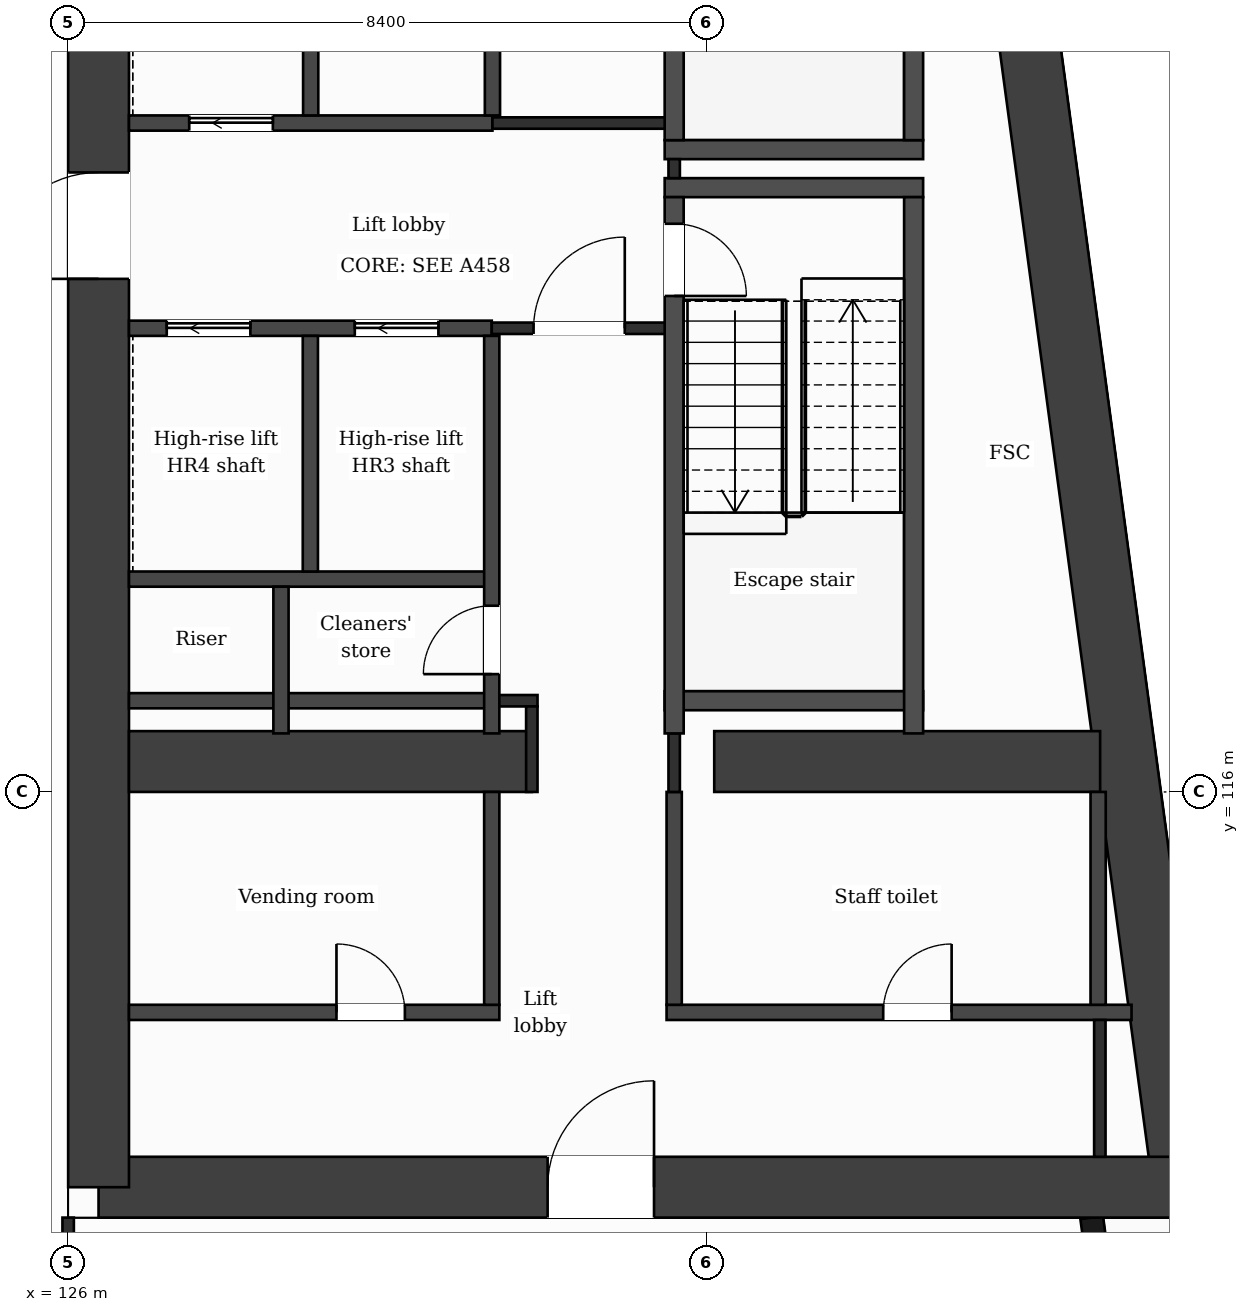
"""IFC4 building model, lengths in metres.
Left out: names, types, materials, properties, quantities, classifications, styles, units other than length and angle.
Written with IfcOpenShell. Run it as: python <this file> out.ifc"""

import sys

from ifc_helpers import new_model, si_unit, direction, frame, frame_2d, origin, place, context, subcontext, project, spatial, rectangle, extrude, element, fill, save


model = new_model("IFC4")
c1 = context("Model", 3, precision=1e-05, world=origin(), true_north=direction((0.0, 1.0)))
c2 = subcontext(c1, "Body", "Model", "MODEL_VIEW")
j1 = project(units=[si_unit("LENGTHUNIT", "METRE"), si_unit("PLANEANGLEUNIT", "RADIAN")], contexts=[c1])
p1 = place(None, origin())
s1 = spatial("IfcSite", under=j1, at=p1, CompositionType="ELEMENT")
p2 = place(p1, origin())
s2 = spatial("IfcBuilding", under=s1, at=p2, CompositionType="ELEMENT")
p3 = place(p2, frame((0.0, 0.0, 235.5)))
s3 = spatial("IfcBuildingStorey", under=s2, at=p3, CompositionType="ELEMENT", Elevation=235.5)
p4 = place(p3, frame((137.82, 132.0, 0.0), z_axis=(0.0, 0.0, 1.0), x_axis=(0.133408347329, -0.991061154956, 0.0)))
e1 = element("IfcWall", 1, at=p4, inside=s3, PredefinedType="SHEAR", context=c2, shape_type="SweptSolid", body=[
    extrude(rectangle(XDim=21.391, YDim=0.8, at=frame_2d((10.696, 0.0))), origin(), (0.0, 0.0, 1.0), 3.7),
])
p5 = place(p3, frame((140.673, 110.8, 0.0), z_axis=(0.0, 0.0, 1.0), x_axis=(-1.0, 0.0, 0.0)))
e2 = element("IfcWall", 2, at=p5, inside=s3, PredefinedType="SHEAR", context=c2, shape_type="SweptSolid", body=[
    extrude(rectangle(XDim=14.273, YDim=0.8, at=frame_2d((7.137, 0.0))), origin(), (0.0, 0.0, 1.0), 3.7),
])
p6 = place(p5, frame((6.965, 0.0, 0.0)))
e3 = element("IfcOpeningElement", 3, at=p6, cuts=e2, PredefinedType="OPENING", context=c2, shape_type="SweptSolid", body=[
    extrude(rectangle(XDim=1.4, YDim=2.1, at=frame_2d((0.7, 1.05))), frame((0.0, 0.41, 0.0), z_axis=(0.0, -1.0, 0.0), x_axis=(1.0, 0.0, 0.0)), (0.0, 0.0, 1.0), 0.82),
])
p7 = place(p3, frame((126.4, 110.8, 0.0), z_axis=(0.0, 0.0, 1.0), x_axis=(0.0, 1.0, 0.0)))
e4 = element("IfcWall", 4, at=p7, inside=s3, PredefinedType="SHEAR", context=c2, shape_type="SweptSolid", body=[
    extrude(rectangle(XDim=21.2, YDim=0.8, at=frame_2d((10.6, 0.0))), origin(), (0.0, 0.0, 1.0), 3.7),
])
p8 = place(p7, frame((11.95, 0.0, 0.0)))
e5 = element("IfcOpeningElement", 5, at=p8, cuts=e4, PredefinedType="OPENING", context=c2, shape_type="SweptSolid", body=[
    extrude(rectangle(XDim=1.4, YDim=2.1, at=frame_2d((0.7, 1.05))), frame((0.0, 0.41, 0.0), z_axis=(0.0, -1.0, 0.0), x_axis=(1.0, 0.0, 0.0)), (0.0, 0.0, 1.0), 0.82),
])
p9 = place(p3, frame((126.8, 116.4, 0.0), z_axis=(0.0, 0.0, 1.0), x_axis=(1.0, 0.0, 0.0)))
e6 = element("IfcWall", 6, at=p9, inside=s3, PredefinedType="SHEAR", context=c2, shape_type="SweptSolid", body=[
    extrude(rectangle(XDim=5.3, YDim=0.8, at=frame_2d((2.65, 0.0))), origin(), (0.0, 0.0, 1.0), 3.7),
])
p10 = place(p3, frame((134.5, 116.4, 0.0), z_axis=(0.0, 0.0, 1.0), x_axis=(1.0, 0.0, 0.0)))
e7 = element("IfcWall", 7, at=p10, inside=s3, PredefinedType="SHEAR", context=c2, shape_type="SweptSolid", body=[
    extrude(rectangle(XDim=5.077, YDim=0.8, at=frame_2d((2.539, 0.0))), origin(), (0.0, 0.0, 1.0), 3.7),
])
p11 = place(p3, frame((140.348, 103.85, 0.0), z_axis=(0.0, 0.0, 1.0), x_axis=(-0.133431549479, 0.991058031401, 0.0)))
e8 = element("IfcWall", 8, at=p11, inside=s3, PredefinedType="SOLIDWALL", context=c2, shape_type="SweptSolid", body=[
    extrude(rectangle(XDim=6.609, YDim=0.3, at=frame_2d((3.304, 0.0))), origin(), (0.0, 0.0, 1.0), 3.38),
])
p12 = place(p11, frame((0.737, 0.0, 0.9)))
e9 = element("IfcOpeningElement", 9, at=p12, cuts=e8, PredefinedType="OPENING", context=c2, shape_type="SweptSolid", body=[
    extrude(rectangle(XDim=1.2, YDim=2.1, at=frame_2d((0.6, 1.05))), frame((0.0, 0.16, 0.0), z_axis=(0.0, -1.0, 0.0), x_axis=(1.0, 0.0, 0.0)), (0.0, 0.0, 1.0), 0.32),
])
p13 = place(p11, frame((3.991, 0.0, 0.0)))
e10 = element("IfcOpeningElement", 10, at=p13, cuts=e8, PredefinedType="OPENING", context=c2, shape_type="SweptSolid", body=[
    extrude(rectangle(XDim=1.2, YDim=2.4, at=frame_2d((0.6, 1.2))), frame((0.0, 0.16, 0.0), z_axis=(0.0, -1.0, 0.0), x_axis=(1.0, 0.0, 0.0)), (0.0, 0.0, 1.0), 0.32),
])
p14 = place(p3, frame((126.8, 113.1, 0.0), z_axis=(0.0, 0.0, 1.0), x_axis=(1.0, 0.0, 0.0)))
e11 = element("IfcWall", 11, at=p14, inside=s3, PredefinedType="PARTITIONING", context=c2, shape_type="SweptSolid", body=[
    extrude(rectangle(XDim=4.873, YDim=0.2, at=frame_2d((2.437, 0.0))), origin(), (0.0, 0.0, 1.0), 3.38),
])
p15 = place(p14, frame((2.73, 0.0, 0.0)))
e12 = element("IfcOpeningElement", 12, at=p15, cuts=e11, PredefinedType="OPENING", context=c2, shape_type="SweptSolid", body=[
    extrude(rectangle(XDim=0.9, YDim=2.1, at=frame_2d((0.45, 1.05))), frame((0.0, 0.11, 0.0), z_axis=(0.0, -1.0, 0.0), x_axis=(1.0, 0.0, 0.0)), (0.0, 0.0, 1.0), 0.22),
])
p16 = place(p3, frame((133.873, 113.1, 0.0), z_axis=(0.0, 0.0, 1.0), x_axis=(1.0, 0.0, 0.0)))
e13 = element("IfcWall", 13, at=p16, inside=s3, PredefinedType="PARTITIONING", context=c2, shape_type="SweptSolid", body=[
    extrude(rectangle(XDim=6.117, YDim=0.2, at=frame_2d((3.059, 0.0))), origin(), (0.0, 0.0, 1.0), 3.38),
])
p17 = place(p16, frame((2.85, 0.0, 0.0)))
e14 = element("IfcOpeningElement", 14, at=p17, cuts=e13, PredefinedType="OPENING", context=c2, shape_type="SweptSolid", body=[
    extrude(rectangle(XDim=0.9, YDim=2.1, at=frame_2d((0.45, 1.05))), frame((0.0, 0.11, 0.0), z_axis=(0.0, -1.0, 0.0), x_axis=(1.0, 0.0, 0.0)), (0.0, 0.0, 1.0), 0.22),
])
p18 = place(p3, frame((126.8, 117.2, 0.0), z_axis=(0.0, 0.0, 1.0), x_axis=(1.0, 0.0, 0.0)))
e15 = element("IfcWall", 15, at=p18, inside=s3, PredefinedType="PARTITIONING", context=c2, shape_type="SweptSolid", body=[
    extrude(rectangle(XDim=4.773, YDim=0.2, at=frame_2d((2.386, 0.0))), origin(), (0.0, 0.0, 1.0), 3.38),
])
p19 = place(p3, frame((131.573, 117.2, 0.0), z_axis=(0.0, 0.0, 1.0), x_axis=(1.0, 0.0, 0.0)))
e16 = element("IfcWall", 16, at=p19, inside=s3, PredefinedType="PARTITIONING", context=c2, shape_type="SweptSolid", body=[
    extrude(rectangle(XDim=0.602, YDim=0.15, at=frame_2d((0.301, 0.0))), origin(), (0.0, 0.0, 1.0), 3.38),
])
p20 = place(p3, frame((133.848, 117.2, 0.0), z_axis=(0.0, 0.0, 1.0), x_axis=(1.0, 0.0, 0.0)))
e17 = element("IfcWall", 17, at=p20, inside=s3, PredefinedType="PARTITIONING", context=c2, shape_type="SweptSolid", body=[
    extrude(rectangle(XDim=3.4, YDim=0.25, at=frame_2d((1.7, 0.0))), origin(), (0.0, 0.0, 1.0), 3.38),
])
p21 = place(p3, frame((126.8, 118.8, 0.0), z_axis=(0.0, 0.0, 1.0), x_axis=(1.0, 0.0, 0.0)))
e18 = element("IfcWall", 18, at=p21, inside=s3, PredefinedType="PARTITIONING", context=c2, shape_type="SweptSolid", body=[
    extrude(rectangle(XDim=4.773, YDim=0.2, at=frame_2d((2.386, 0.0))), origin(), (0.0, 0.0, 1.0), 3.38),
])
p22 = place(p3, frame((126.8, 122.1, 0.0), z_axis=(0.0, 0.0, 1.0), x_axis=(1.0, 0.0, 0.0)))
e19 = element("IfcWall", 19, at=p22, inside=s3, PredefinedType="PARTITIONING", context=c2, shape_type="SweptSolid", body=[
    extrude(rectangle(XDim=4.773, YDim=0.2, at=frame_2d((2.386, 0.0))), origin(), (0.0, 0.0, 1.0), 3.38),
])
p23 = place(p22, frame((2.971, 0.0, 0.0)))
e20 = element("IfcOpeningElement", 20, at=p23, cuts=e19, PredefinedType="OPENING", context=c2, shape_type="SweptSolid", body=[
    extrude(rectangle(XDim=1.1, YDim=2.1, at=frame_2d((0.55, 1.05))), frame((0.0, 0.11, 0.0), z_axis=(0.0, -1.0, 0.0), x_axis=(1.0, 0.0, 0.0)), (0.0, 0.0, 1.0), 0.22),
])
p24 = place(p22, frame((0.497, 0.0, 0.0)))
e21 = element("IfcOpeningElement", 21, at=p24, cuts=e19, PredefinedType="OPENING", context=c2, shape_type="SweptSolid", body=[
    extrude(rectangle(XDim=1.1, YDim=2.1, at=frame_2d((0.55, 1.05))), frame((0.0, 0.11, 0.0), z_axis=(0.0, -1.0, 0.0), x_axis=(1.0, 0.0, 0.0)), (0.0, 0.0, 1.0), 0.22),
])
p25 = place(p3, frame((131.573, 122.1, 0.0), z_axis=(0.0, 0.0, 1.0), x_axis=(1.0, 0.0, 0.0)))
e22 = element("IfcWall", 22, at=p25, inside=s3, PredefinedType="PARTITIONING", context=c2, shape_type="SweptSolid", body=[
    extrude(rectangle(XDim=2.4, YDim=0.15, at=frame_2d((1.2, 0.0))), origin(), (0.0, 0.0, 1.0), 3.38),
])
p26 = place(p25, frame((0.55, 0.0, 0.0)))
e23 = element("IfcOpeningElement", 23, at=p26, cuts=e22, PredefinedType="OPENING", context=c2, shape_type="SweptSolid", body=[
    extrude(rectangle(XDim=1.2, YDim=2.1, at=frame_2d((0.6, 1.05))), frame((0.0, 0.085, 0.0), z_axis=(0.0, -1.0, 0.0), x_axis=(1.0, 0.0, 0.0)), (0.0, 0.0, 1.0), 0.17),
])
for number, where, z_axis, x_axis in (
    (24, (133.848, 123.95, 0.0), (0.0, 0.0, 1.0), (1.0, 0.0, 0.0)),
    (25, (133.848, 124.45, 0.0), (0.0, 0.0, 1.0), (1.0, 0.0, 0.0)),
):
    element("IfcWall", number, at=place(p3, frame(where, z_axis=z_axis, x_axis=x_axis)), inside=s3, PredefinedType="PARTITIONING", context=c2, shape_type="SweptSolid", body=[
        extrude(rectangle(XDim=3.4, YDim=0.25, at=frame_2d((1.7, 0.0))), origin(), (0.0, 0.0, 1.0), 3.38),
    ])
p27 = place(p3, frame((126.8, 124.8, 0.0), z_axis=(0.0, 0.0, 1.0), x_axis=(1.0, 0.0, 0.0)))
e26 = element("IfcWall", 26, at=p27, inside=s3, PredefinedType="PARTITIONING", context=c2, shape_type="SweptSolid", body=[
    extrude(rectangle(XDim=4.782, YDim=0.2, at=frame_2d((2.391, 0.0))), origin(), (0.0, 0.0, 1.0), 3.38),
])
p28 = place(p27, frame((0.793, 0.0, 0.0)))
e27 = element("IfcOpeningElement", 27, at=p28, cuts=e26, PredefinedType="OPENING", context=c2, shape_type="SweptSolid", body=[
    extrude(rectangle(XDim=1.1, YDim=2.1, at=frame_2d((0.55, 1.05))), frame((0.0, 0.11, 0.0), z_axis=(0.0, -1.0, 0.0), x_axis=(1.0, 0.0, 0.0)), (0.0, 0.0, 1.0), 0.22),
])
p29 = place(p3, frame((131.582, 124.8, 0.0), z_axis=(0.0, 0.0, 1.0), x_axis=(1.0, 0.0, 0.0)))
e28 = element("IfcWall", 28, at=p29, inside=s3, PredefinedType="PARTITIONING", context=c2, shape_type="SweptSolid", body=[
    extrude(rectangle(XDim=2.516, YDim=0.15, at=frame_2d((1.258, 0.0))), origin(), (0.0, 0.0, 1.0), 3.38),
])
p30 = place(p3, frame((126.0, 109.075, 0.0), z_axis=(0.0, 0.0, 1.0), x_axis=(0.0, 1.0, 0.0)))
e29 = element("IfcWall", 29, at=p30, inside=s3, PredefinedType="PARTITIONING", context=c2, shape_type="SweptSolid", body=[
    extrude(rectangle(XDim=1.325, YDim=0.15, at=frame_2d((0.663, 0.0))), origin(), (0.0, 0.0, 1.0), 3.38),
])
p31 = place(p3, frame((128.8, 116.77, 0.0), z_axis=(0.0, 0.0, 1.0), x_axis=(0.0, 1.0, 0.0)))
e30 = element("IfcWall", 30, at=p31, inside=s3, PredefinedType="PARTITIONING", context=c2, shape_type="SweptSolid", body=[
    extrude(rectangle(XDim=1.93, YDim=0.2, at=frame_2d((0.965, 0.0))), origin(), (0.0, 0.0, 1.0), 3.38),
])
for number, where, z_axis, x_axis in (
    (31, (129.187, 118.9, 0.0), (0.0, 0.0, 1.0), (0.0, 1.0, 0.0)),
    (32, (129.191, 124.9, 0.0), (0.0, 0.0, 1.0), (0.0, 1.0, 0.0)),
):
    element("IfcWall", number, at=place(p3, frame(where, z_axis=z_axis, x_axis=x_axis)), inside=s3, PredefinedType="PARTITIONING", context=c2, shape_type="SweptSolid", body=[
        extrude(rectangle(XDim=3.1, YDim=0.2, at=frame_2d((1.55, 0.0))), origin(), (0.0, 0.0, 1.0), 3.38),
    ])
p32 = place(p3, frame((131.573, 113.2, 0.0), z_axis=(0.0, 0.0, 1.0), x_axis=(0.0, 1.0, 0.0)))
e33 = element("IfcWall", 33, at=p32, inside=s3, PredefinedType="PARTITIONING", context=c2, shape_type="SweptSolid", body=[
    extrude(rectangle(XDim=2.8, YDim=0.2, at=frame_2d((1.4, 0.0))), origin(), (0.0, 0.0, 1.0), 3.38),
])
p33 = place(p3, frame((131.573, 116.77, 0.0), z_axis=(0.0, 0.0, 1.0), x_axis=(0.0, 1.0, 0.0)))
e34 = element("IfcWall", 34, at=p33, inside=s3, PredefinedType="PARTITIONING", context=c2, shape_type="SweptSolid", body=[
    extrude(rectangle(XDim=5.23, YDim=0.2, at=frame_2d((2.615, 0.0))), origin(), (0.0, 0.0, 1.0), 3.38),
])
p34 = place(p33, frame((0.78, 0.0, 0.0)))
e35 = element("IfcOpeningElement", 35, at=p34, cuts=e34, PredefinedType="OPENING", context=c2, shape_type="SweptSolid", body=[
    extrude(rectangle(XDim=0.9, YDim=2.1, at=frame_2d((0.45, 1.05))), frame((0.0, 0.11, 0.0), z_axis=(0.0, -1.0, 0.0), x_axis=(1.0, 0.0, 0.0)), (0.0, 0.0, 1.0), 0.22),
])
p35 = place(p3, frame((131.582, 124.9, 0.0), z_axis=(0.0, 0.0, 1.0), x_axis=(0.0, 1.0, 0.0)))
e36 = element("IfcWall", 36, at=p35, inside=s3, PredefinedType="PARTITIONING", context=c2, shape_type="SweptSolid", body=[
    extrude(rectangle(XDim=3.1, YDim=0.2, at=frame_2d((1.55, 0.0))), origin(), (0.0, 0.0, 1.0), 3.38),
])
p36 = place(p3, frame((132.1, 116.0, 0.0), z_axis=(0.0, 0.0, 1.0), x_axis=(0.0, 1.0, 0.0)))
e37 = element("IfcWall", 37, at=p36, inside=s3, PredefinedType="PARTITIONING", context=c2, shape_type="SweptSolid", body=[
    extrude(rectangle(XDim=1.125, YDim=0.15, at=frame_2d((0.562, 0.0))), origin(), (0.0, 0.0, 1.0), 3.38),
])
p37 = place(p3, frame((133.973, 113.2, 0.0), z_axis=(0.0, 0.0, 1.0), x_axis=(0.0, 1.0, 0.0)))
e38 = element("IfcWall", 38, at=p37, inside=s3, PredefinedType="PARTITIONING", context=c2, shape_type="SweptSolid", body=[
    extrude(rectangle(XDim=2.8, YDim=0.2, at=frame_2d((1.4, 0.0))), origin(), (0.0, 0.0, 1.0), 3.38),
])
p38 = place(p3, frame((133.973, 116.0, 0.0), z_axis=(0.0, 0.0, 1.0), x_axis=(0.0, 1.0, 0.0)))
e39 = element("IfcWall", 39, at=p38, inside=s3, PredefinedType="PARTITIONING", context=c2, shape_type="SweptSolid", body=[
    extrude(rectangle(XDim=0.77, YDim=0.15, at=frame_2d((0.385, 0.0))), origin(), (0.0, 0.0, 1.0), 3.38),
])
p39 = place(p3, frame((133.973, 124.075, 0.0), z_axis=(0.0, 0.0, 1.0), x_axis=(0.0, 1.0, 0.0)))
e40 = element("IfcWall", 40, at=p39, inside=s3, PredefinedType="PARTITIONING", context=c2, shape_type="SweptSolid", body=[
    extrude(rectangle(XDim=0.25, YDim=0.15, at=frame_2d((0.125, 0.0))), origin(), (0.0, 0.0, 1.0), 3.38),
])
p40 = place(p3, frame((133.973, 116.77, 0.0), z_axis=(0.0, 0.0, 1.0), x_axis=(0.0, 1.0, 0.0)))
e41 = element("IfcWall", 41, at=p40, inside=s3, PredefinedType="PARTITIONING", context=c2, shape_type="SweptSolid", body=[
    extrude(rectangle(XDim=7.055, YDim=0.25, at=frame_2d((3.527, 0.0))), origin(), (0.0, 0.0, 1.0), 3.38),
])
p41 = place(p40, frame((5.755, 0.0, 0.0)))
e42 = element("IfcOpeningElement", 42, at=p41, cuts=e41, PredefinedType="OPENING", context=c2, shape_type="SweptSolid", body=[
    extrude(rectangle(XDim=0.95, YDim=2.1, at=frame_2d((0.475, 1.05))), frame((0.0, 0.135, 0.0), z_axis=(0.0, -1.0, 0.0), x_axis=(1.0, 0.0, 0.0)), (0.0, 0.0, 1.0), 0.27),
])
p42 = place(p3, frame((133.973, 124.575, 0.0), z_axis=(0.0, 0.0, 1.0), x_axis=(0.0, 1.0, 0.0)))
e43 = element("IfcWall", 43, at=p42, inside=s3, PredefinedType="PARTITIONING", context=c2, shape_type="SweptSolid", body=[
    extrude(rectangle(XDim=7.055, YDim=0.25, at=frame_2d((3.527, 0.0))), origin(), (0.0, 0.0, 1.0), 3.38),
])
p43 = place(p42, frame((5.325, 0.0, 0.0)))
e44 = element("IfcOpeningElement", 44, at=p43, cuts=e43, PredefinedType="OPENING", context=c2, shape_type="SweptSolid", body=[
    extrude(rectangle(XDim=1.0, YDim=2.1, at=frame_2d((0.5, 1.05))), frame((0.0, 0.135, 0.0), z_axis=(0.0, -1.0, 0.0), x_axis=(1.0, 0.0, 0.0)), (0.0, 0.0, 1.0), 0.27),
])
for number, where, z_axis, x_axis in (
    (45, (137.123, 116.77, 0.0), (0.0, 0.0, 1.0), (0.0, 1.0, 0.0)),
    (46, (137.123, 124.575, 0.0), (0.0, 0.0, 1.0), (0.0, 1.0, 0.0)),
):
    element("IfcWall", number, at=place(p3, frame(where, z_axis=z_axis, x_axis=x_axis)), inside=s3, PredefinedType="PARTITIONING", context=c2, shape_type="SweptSolid", body=[
        extrude(rectangle(XDim=7.055, YDim=0.25, at=frame_2d((3.527, 0.0))), origin(), (0.0, 0.0, 1.0), 3.38),
    ])
p44 = place(p3, frame((139.551, 113.2, 0.0), z_axis=(0.0, 0.0, 1.0), x_axis=(0.0, 1.0, 0.0)))
e47 = element("IfcWall", 47, at=p44, inside=s3, PredefinedType="PARTITIONING", context=c2, shape_type="SweptSolid", body=[
    extrude(rectangle(XDim=2.8, YDim=0.2, at=frame_2d((1.4, 0.0))), origin(), (0.0, 0.0, 1.0), 3.38),
])
p45 = place(p3, frame((139.573, 111.2, 0.0), z_axis=(0.0, 0.0, 1.0), x_axis=(0.0, 1.0, 0.0)))
e48 = element("IfcWall", 48, at=p45, inside=s3, PredefinedType="PARTITIONING", context=c2, shape_type="SweptSolid", body=[
    extrude(rectangle(XDim=1.8, YDim=0.15, at=frame_2d((0.9, 0.0))), origin(), (0.0, 0.0, 1.0), 3.38),
])
p46 = place(p26, origin())
e49 = element("IfcDoor", 49, at=p46, inside=s3, OperationType="SINGLE_SWING_RIGHT", PredefinedType="DOOR", context=c2, shape_type="SweptSolid", body=[
    extrude(rectangle(XDim=1.2, YDim=2.1, at=frame_2d((0.6, 1.05))), frame((0.0, 0.025, 0.0), z_axis=(0.0, -1.0, 0.0), x_axis=(1.0, 0.0, 0.0)), (0.0, 0.0, 1.0), 0.05),
])
fill(e23, e49)
p47 = place(p23, origin())
e50 = element("IfcDoor", 50, at=p47, inside=s3, OperationType="SLIDING_TO_LEFT", PredefinedType="DOOR", context=c2, shape_type="SweptSolid", body=[
    extrude(rectangle(XDim=1.1, YDim=2.1, at=frame_2d((0.55, 1.05))), frame((0.0, 0.025, 0.0), z_axis=(0.0, -1.0, 0.0), x_axis=(1.0, 0.0, 0.0)), (0.0, 0.0, 1.0), 0.05),
])
fill(e20, e50)
p48 = place(p24, origin())
e51 = element("IfcDoor", 51, at=p48, inside=s3, OperationType="SLIDING_TO_LEFT", PredefinedType="DOOR", context=c2, shape_type="SweptSolid", body=[
    extrude(rectangle(XDim=1.1, YDim=2.1, at=frame_2d((0.55, 1.05))), frame((0.0, 0.025, 0.0), z_axis=(0.0, -1.0, 0.0), x_axis=(1.0, 0.0, 0.0)), (0.0, 0.0, 1.0), 0.05),
])
fill(e21, e51)
p49 = place(p28, origin())
e52 = element("IfcDoor", 52, at=p49, inside=s3, OperationType="SLIDING_TO_LEFT", PredefinedType="DOOR", context=c2, shape_type="SweptSolid", body=[
    extrude(rectangle(XDim=1.1, YDim=2.1, at=frame_2d((0.55, 1.05))), frame((0.0, 0.025, 0.0), z_axis=(0.0, -1.0, 0.0), x_axis=(1.0, 0.0, 0.0)), (0.0, 0.0, 1.0), 0.05),
])
fill(e27, e52)
p50 = place(p41, origin())
e53 = element("IfcDoor", 53, at=p50, inside=s3, OperationType="SINGLE_SWING_LEFT", PredefinedType="DOOR", context=c2, shape_type="SweptSolid", body=[
    extrude(rectangle(XDim=0.95, YDim=2.1, at=frame_2d((0.475, 1.05))), frame((0.0, 0.025, 0.0), z_axis=(0.0, -1.0, 0.0), x_axis=(1.0, 0.0, 0.0)), (0.0, 0.0, 1.0), 0.05),
])
fill(e42, e53)
p51 = place(p34, origin())
e54 = element("IfcDoor", 54, at=p51, inside=s3, OperationType="SINGLE_SWING_LEFT", PredefinedType="DOOR", context=c2, shape_type="SweptSolid", body=[
    extrude(rectangle(XDim=0.9, YDim=2.1, at=frame_2d((0.45, 1.05))), frame((0.0, 0.025, 0.0), z_axis=(0.0, -1.0, 0.0), x_axis=(1.0, 0.0, 0.0)), (0.0, 0.0, 1.0), 0.05),
])
fill(e35, e54)
p52 = place(p17, origin())
e55 = element("IfcDoor", 55, at=p52, inside=s3, OperationType="SINGLE_SWING_RIGHT", PredefinedType="DOOR", context=c2, shape_type="SweptSolid", body=[
    extrude(rectangle(XDim=0.9, YDim=2.1, at=frame_2d((0.45, 1.05))), frame((0.0, 0.025, 0.0), z_axis=(0.0, -1.0, 0.0), x_axis=(1.0, 0.0, 0.0)), (0.0, 0.0, 1.0), 0.05),
])
fill(e14, e55)
p53 = place(p15, origin())
e56 = element("IfcDoor", 56, at=p53, inside=s3, OperationType="SINGLE_SWING_LEFT", PredefinedType="DOOR", context=c2, shape_type="SweptSolid", body=[
    extrude(rectangle(XDim=0.9, YDim=2.1, at=frame_2d((0.45, 1.05))), frame((0.0, 0.025, 0.0), z_axis=(0.0, -1.0, 0.0), x_axis=(1.0, 0.0, 0.0)), (0.0, 0.0, 1.0), 0.05),
])
fill(e12, e56)
p54 = place(p6, origin())
e57 = element("IfcDoor", 57, at=p54, inside=s3, OperationType="SINGLE_SWING_LEFT", PredefinedType="DOOR", context=c2, shape_type="SweptSolid", body=[
    extrude(rectangle(XDim=1.4, YDim=2.1, at=frame_2d((0.7, 1.05))), frame((0.0, 0.025, 0.0), z_axis=(0.0, -1.0, 0.0), x_axis=(1.0, 0.0, 0.0)), (0.0, 0.0, 1.0), 0.05),
])
fill(e3, e57)
p55 = place(p8, origin())
e58 = element("IfcDoor", 58, at=p55, inside=s3, OperationType="SINGLE_SWING_LEFT", PredefinedType="DOOR", context=c2, shape_type="SweptSolid", body=[
    extrude(rectangle(XDim=1.4, YDim=2.1, at=frame_2d((0.7, 1.05))), frame((0.0, 0.025, 0.0), z_axis=(0.0, -1.0, 0.0), x_axis=(1.0, 0.0, 0.0)), (0.0, 0.0, 1.0), 0.05),
])
fill(e5, e58)
save(model, sys.argv[1])
